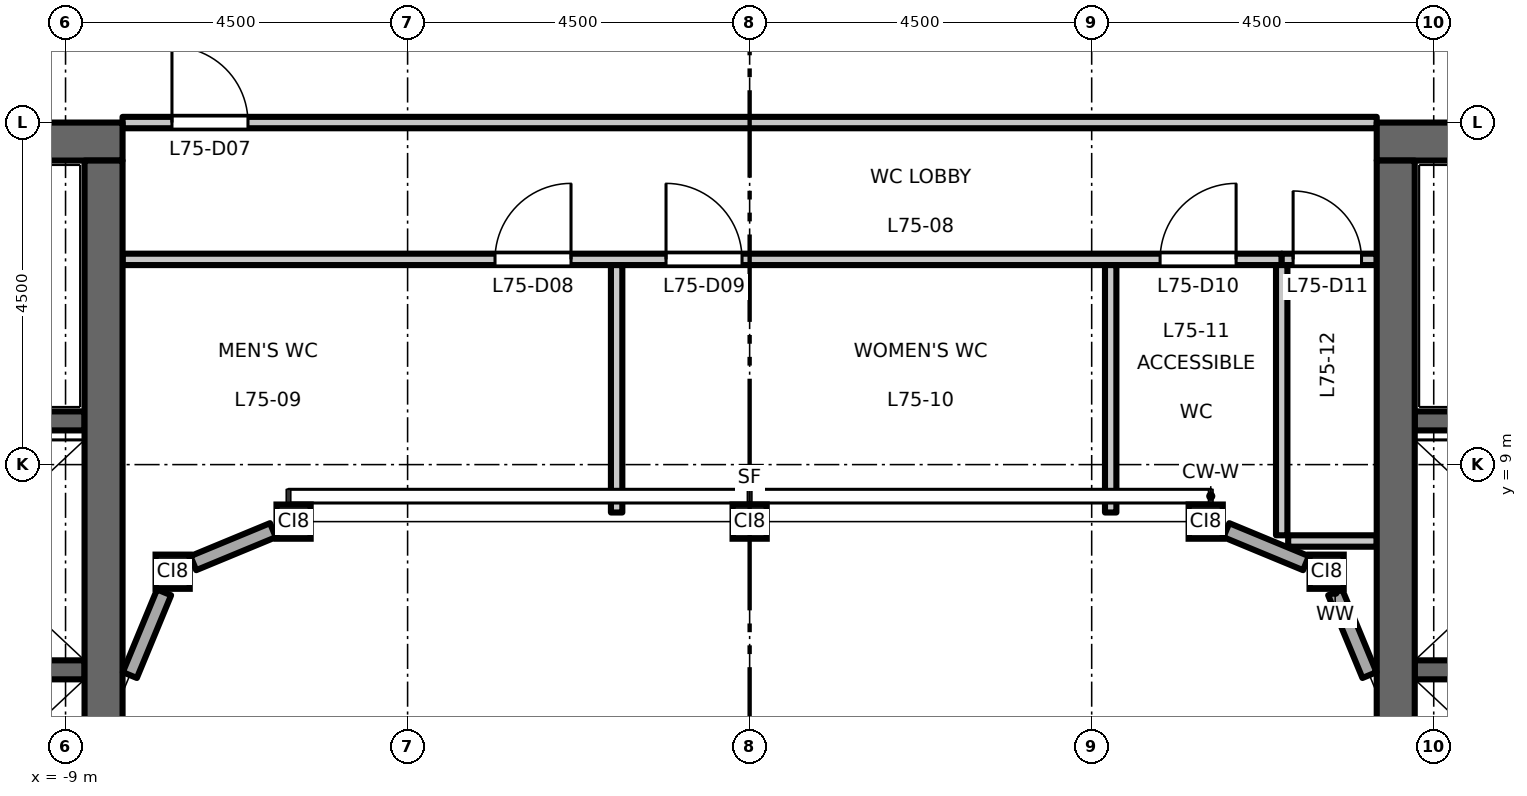
"""IFC4 building model, lengths in metres.
Left out: names, types, materials, properties, quantities, classifications, styles, units other than length and angle.
Written with IfcOpenShell. Run it as: python <this file> out.ifc"""

import sys

from ifc_helpers import new_model, si_unit, direction, frame, frame_2d, origin, origin_2d, place, context, subcontext, project, spatial, rectangle, hollow_rectangle, extrude, element, fill, save


model = new_model("IFC4")
c1 = context("Model", 3, precision=1e-05, world=origin(), true_north=direction((0.0, 1.0)))
c2 = subcontext(c1, "Body", "Model", "MODEL_VIEW")
j1 = project(units=[si_unit("LENGTHUNIT", "METRE"), si_unit("PLANEANGLEUNIT", "RADIAN")], contexts=[c1])
p1 = place(None, origin())
s1 = spatial("IfcSite", under=j1, at=p1, CompositionType="ELEMENT")
p2 = place(p1, origin())
s2 = spatial("IfcBuilding", under=s1, at=p2, CompositionType="ELEMENT")
p3 = place(p2, frame((0.0, 0.0, 348.2)))
s3 = spatial("IfcBuildingStorey", under=s2, at=p3, CompositionType="ELEMENT", Elevation=348.2)
for number, where, z_axis, x_axis in (
    (1, (-7.591, 7.591, 0.0), (0.0, 0.0, 1.0), (1.0, 0.0, 0.0)),
    (2, (-6.0, 8.25, 0.0), (0.0, 0.0, 1.0), (1.0, 0.0, 0.0)),
    (3, (0.0, 8.25, 0.0), (0.0, 0.0, 1.0), (1.0, 0.0, 0.0)),
    (4, (6.0, 8.25, 0.0), (0.0, 0.0, 1.0), (1.0, 0.0, 0.0)),
    (5, (7.591, 7.591, 0.0), (0.0, 0.0, 1.0), (1.0, 0.0, 0.0)),
):
    element("IfcColumn", number, at=place(p3, frame(where, z_axis=z_axis, x_axis=x_axis)), inside=s3, PredefinedType="COLUMN", context=c2, shape_type="SweptSolid", body=[
        extrude(hollow_rectangle(XDim=0.45, YDim=0.45, WallThickness=0.022, at=origin_2d()), origin(), (0.0, 0.0, 1.0), 5.0),
    ])
p4 = place(p3, frame((-8.75, 6.3, 0.0), z_axis=(0.0, 0.0, 1.0), x_axis=(-1.0, 0.0, 0.0)))
e6 = element("IfcWall", 6, at=p4, inside=s3, PredefinedType="SHEAR", context=c2, shape_type="SweptSolid", body=[
    extrude(rectangle(XDim=3.1, YDim=0.25, at=frame_2d((1.55, 0.0))), origin(), (0.0, 0.0, 1.0), 4.8),
])
p5 = place(p3, frame((-8.75, 9.575, 0.0), z_axis=(0.0, 0.0, 1.0), x_axis=(-1.0, 0.0, 0.0)))
e7 = element("IfcWall", 7, at=p5, inside=s3, PredefinedType="SHEAR", context=c2, shape_type="SweptSolid", body=[
    extrude(rectangle(XDim=8.0, YDim=0.25, at=frame_2d((4.0, 0.0))), origin(), (0.0, 0.0, 1.0), 4.8),
])
p6 = place(p5, frame((6.65, 0.0, 0.0)))
e8 = element("IfcOpeningElement", 8, at=p6, cuts=e7, PredefinedType="OPENING", context=c2, shape_type="SweptSolid", body=[
    extrude(rectangle(XDim=1.1, YDim=2.1, at=frame_2d((0.55, 1.05))), frame((0.0, 0.135, 0.0), z_axis=(0.0, -1.0, 0.0), x_axis=(1.0, 0.0, 0.0)), (0.0, 0.0, 1.0), 0.27),
])
p7 = place(p3, frame((-8.25, 13.25, 0.0), z_axis=(0.0, 0.0, 1.0), x_axis=(-1.0, 0.0, 0.0)))
e9 = element("IfcWall", 9, at=p7, inside=s3, PredefinedType="SHEAR", context=c2, shape_type="SweptSolid", body=[
    extrude(rectangle(XDim=9.0, YDim=0.5, at=frame_2d((4.5, 0.0))), origin(), (0.0, 0.0, 1.0), 4.8),
])
p8 = place(p3, frame((-8.5, -13.0, 0.0), z_axis=(0.0, 0.0, 1.0), x_axis=(0.0, 1.0, 0.0)))
e10 = element("IfcWall", 10, at=p8, inside=s3, PredefinedType="SHEAR", context=c2, shape_type="SweptSolid", body=[
    extrude(rectangle(XDim=26.0, YDim=0.5, at=frame_2d((13.0, 0.0))), origin(), (0.0, 0.0, 1.0), 4.8),
])
p9 = place(p3, frame((8.75, 6.3, 0.0), z_axis=(0.0, 0.0, 1.0), x_axis=(1.0, 0.0, 0.0)))
e11 = element("IfcWall", 11, at=p9, inside=s3, PredefinedType="SHEAR", context=c2, shape_type="SweptSolid", body=[
    extrude(rectangle(XDim=3.1, YDim=0.25, at=frame_2d((1.55, 0.0))), origin(), (0.0, 0.0, 1.0), 4.8),
])
p10 = place(p3, frame((8.75, 9.575, 0.0), z_axis=(0.0, 0.0, 1.0), x_axis=(1.0, 0.0, 0.0)))
e12 = element("IfcWall", 12, at=p10, inside=s3, PredefinedType="SHEAR", context=c2, shape_type="SweptSolid", body=[
    extrude(rectangle(XDim=8.0, YDim=0.25, at=frame_2d((4.0, 0.0))), origin(), (0.0, 0.0, 1.0), 4.8),
])
p11 = place(p10, frame((6.65, 0.0, 0.0)))
e13 = element("IfcOpeningElement", 13, at=p11, cuts=e12, PredefinedType="OPENING", context=c2, shape_type="SweptSolid", body=[
    extrude(rectangle(XDim=1.1, YDim=2.1, at=frame_2d((0.55, 1.05))), frame((0.0, 0.135, 0.0), z_axis=(0.0, -1.0, 0.0), x_axis=(1.0, 0.0, 0.0)), (0.0, 0.0, 1.0), 0.27),
])
p12 = place(p3, frame((8.25, 13.25, 0.0), z_axis=(0.0, 0.0, 1.0), x_axis=(1.0, 0.0, 0.0)))
e14 = element("IfcWall", 14, at=p12, inside=s3, PredefinedType="SHEAR", context=c2, shape_type="SweptSolid", body=[
    extrude(rectangle(XDim=9.0, YDim=0.5, at=frame_2d((4.5, 0.0))), origin(), (0.0, 0.0, 1.0), 4.8),
])
p13 = place(p3, frame((8.5, -13.0, 0.0), z_axis=(0.0, 0.0, 1.0), x_axis=(0.0, 1.0, 0.0)))
e15 = element("IfcWall", 15, at=p13, inside=s3, PredefinedType="SHEAR", context=c2, shape_type="SweptSolid", body=[
    extrude(rectangle(XDim=26.0, YDim=0.5, at=frame_2d((13.0, 0.0))), origin(), (0.0, 0.0, 1.0), 4.8),
])
p14 = place(p3, frame((8.154, 6.231, 0.0), z_axis=(0.0, 0.0, 1.0), x_axis=(-0.382760542083, 0.92384758885, 0.0)))
e16 = element("IfcWall", 16, at=p14, inside=s3, PredefinedType="STANDARD", context=c2, shape_type="SweptSolid", body=[
    extrude(rectangle(XDim=1.178, YDim=0.2, at=frame_2d((0.589, 0.0))), origin(), (0.0, 0.0, 1.0), 4.46),
])
for number, where, z_axis, x_axis in (
    (17, (7.319, 7.703, 0.0), (0.0, 0.0, 1.0), (-0.924, 0.383, 0.0)),
    (18, (-6.271, 8.137, 0.0), (0.0, 0.0, 1.0), (-0.924, -0.383, 0.0)),
):
    element("IfcWall", number, at=place(p3, frame(where, z_axis=z_axis, x_axis=x_axis)), inside=s3, PredefinedType="STANDARD", context=c2, shape_type="SweptSolid", body=[
        extrude(rectangle(XDim=1.134, YDim=0.2, at=frame_2d((0.567, 0.0))), origin(), (0.0, 0.0, 1.0), 4.46),
    ])
p15 = place(p3, frame((-7.703, 7.319, 0.0), z_axis=(0.0, 0.0, 1.0), x_axis=(-0.382760542083, -0.92384758885, 0.0)))
e19 = element("IfcWall", 19, at=p15, inside=s3, PredefinedType="STANDARD", context=c2, shape_type="SweptSolid", body=[
    extrude(rectangle(XDim=1.178, YDim=0.2, at=frame_2d((0.589, 0.0))), origin(), (0.0, 0.0, 1.0), 4.46),
])
p16 = place(p3, frame((7.085, 7.995, 0.0), z_axis=(0.0, 0.0, 1.0), x_axis=(1.0, 0.0, 0.0)))
e20 = element("IfcWall", 20, at=p16, inside=s3, PredefinedType="PARTITIONING", context=c2, shape_type="SweptSolid", body=[
    extrude(rectangle(XDim=1.165, YDim=0.15, at=frame_2d((0.583, 0.0))), origin(), (0.0, 0.0, 1.0), 4.8),
])
p17 = place(p3, frame((-8.25, 11.7, 0.0), z_axis=(0.0, 0.0, 1.0), x_axis=(1.0, 0.0, 0.0)))
e21 = element("IfcWall", 21, at=p17, inside=s3, PredefinedType="PARTITIONING", context=c2, shape_type="SweptSolid", body=[
    extrude(rectangle(XDim=15.25, YDim=0.15, at=frame_2d((7.625, 0.0))), origin(), (0.0, 0.0, 1.0), 4.8),
])
p18 = place(p17, frame((4.9, 0.0, 0.0)))
e22 = element("IfcOpeningElement", 22, at=p18, cuts=e21, PredefinedType="OPENING", context=c2, shape_type="SweptSolid", body=[
    extrude(rectangle(XDim=1.0, YDim=2.1, at=frame_2d((0.5, 1.05))), frame((0.0, 0.085, 0.0), z_axis=(0.0, -1.0, 0.0), x_axis=(1.0, 0.0, 0.0)), (0.0, 0.0, 1.0), 0.17),
])
p19 = place(p17, frame((7.15, 0.0, 0.0)))
e23 = element("IfcOpeningElement", 23, at=p19, cuts=e21, PredefinedType="OPENING", context=c2, shape_type="SweptSolid", body=[
    extrude(rectangle(XDim=1.0, YDim=2.1, at=frame_2d((0.5, 1.05))), frame((0.0, 0.085, 0.0), z_axis=(0.0, -1.0, 0.0), x_axis=(1.0, 0.0, 0.0)), (0.0, 0.0, 1.0), 0.17),
])
p20 = place(p17, frame((13.65, 0.0, 0.0)))
e24 = element("IfcOpeningElement", 24, at=p20, cuts=e21, PredefinedType="OPENING", context=c2, shape_type="SweptSolid", body=[
    extrude(rectangle(XDim=1.0, YDim=2.1, at=frame_2d((0.5, 1.05))), frame((0.0, 0.085, 0.0), z_axis=(0.0, -1.0, 0.0), x_axis=(1.0, 0.0, 0.0)), (0.0, 0.0, 1.0), 0.17),
])
p21 = place(p3, frame((7.0, 11.7, 0.0), z_axis=(0.0, 0.0, 1.0), x_axis=(1.0, 0.0, 0.0)))
e25 = element("IfcWall", 25, at=p21, inside=s3, PredefinedType="PARTITIONING", context=c2, shape_type="SweptSolid", body=[
    extrude(rectangle(XDim=1.25, YDim=0.15, at=frame_2d((0.625, 0.0))), origin(), (0.0, 0.0, 1.0), 4.8),
])
p22 = place(p21, frame((0.15, 0.0, 0.0)))
e26 = element("IfcOpeningElement", 26, at=p22, cuts=e25, PredefinedType="OPENING", context=c2, shape_type="SweptSolid", body=[
    extrude(rectangle(XDim=0.9, YDim=2.1, at=frame_2d((0.45, 1.05))), frame((0.0, 0.085, 0.0), z_axis=(0.0, -1.0, 0.0), x_axis=(1.0, 0.0, 0.0)), (0.0, 0.0, 1.0), 0.17),
])
p23 = place(p3, frame((-8.25, 13.5, 0.0), z_axis=(0.0, 0.0, 1.0), x_axis=(1.0, 0.0, 0.0)))
e27 = element("IfcWall", 27, at=p23, inside=s3, PredefinedType="PARTITIONING", context=c2, shape_type="SweptSolid", body=[
    extrude(rectangle(XDim=16.5, YDim=0.15, at=frame_2d((8.25, 0.0))), origin(), (0.0, 0.0, 1.0), 4.8),
])
p24 = place(p23, frame((0.65, 0.0, 0.0)))
e28 = element("IfcOpeningElement", 28, at=p24, cuts=e27, PredefinedType="OPENING", context=c2, shape_type="SweptSolid", body=[
    extrude(rectangle(XDim=1.0, YDim=2.1, at=frame_2d((0.5, 1.05))), frame((0.0, 0.085, 0.0), z_axis=(0.0, -1.0, 0.0), x_axis=(1.0, 0.0, 0.0)), (0.0, 0.0, 1.0), 0.17),
])
for number, where, z_axis, x_axis in (
    (29, (-1.75, 8.37, 0.0), (0.0, 0.0, 1.0), (0.0, 1.0, 0.0)),
    (30, (4.75, 8.37, 0.0), (0.0, 0.0, 1.0), (0.0, 1.0, 0.0)),
):
    element("IfcWall", number, at=place(p3, frame(where, z_axis=z_axis, x_axis=x_axis)), inside=s3, PredefinedType="PARTITIONING", context=c2, shape_type="SweptSolid", body=[
        extrude(rectangle(XDim=3.255, YDim=0.15, at=frame_2d((1.627, 0.0))), origin(), (0.0, 0.0, 1.0), 4.8),
    ])
p25 = place(p3, frame((7.0, 8.07, 0.0), z_axis=(0.0, 0.0, 1.0), x_axis=(0.0, 1.0, 0.0)))
e31 = element("IfcWall", 31, at=p25, inside=s3, PredefinedType="PARTITIONING", context=c2, shape_type="SweptSolid", body=[
    extrude(rectangle(XDim=3.555, YDim=0.15, at=frame_2d((1.777, 0.0))), origin(), (0.0, 0.0, 1.0), 4.8),
])
p26 = place(p24, origin())
e32 = element("IfcDoor", 32, at=p26, inside=s3, OperationType="SINGLE_SWING_LEFT", PredefinedType="DOOR", context=c2, shape_type="SweptSolid", body=[
    extrude(rectangle(XDim=1.0, YDim=2.1, at=frame_2d((0.5, 1.05))), frame((0.0, 0.025, 0.0), z_axis=(0.0, -1.0, 0.0), x_axis=(1.0, 0.0, 0.0)), (0.0, 0.0, 1.0), 0.05),
])
fill(e28, e32)
p27 = place(p18, origin())
e33 = element("IfcDoor", 33, at=p27, inside=s3, OperationType="SINGLE_SWING_RIGHT", PredefinedType="DOOR", context=c2, shape_type="SweptSolid", body=[
    extrude(rectangle(XDim=1.0, YDim=2.1, at=frame_2d((0.5, 1.05))), frame((0.0, 0.025, 0.0), z_axis=(0.0, -1.0, 0.0), x_axis=(1.0, 0.0, 0.0)), (0.0, 0.0, 1.0), 0.05),
])
fill(e22, e33)
p28 = place(p19, origin())
e34 = element("IfcDoor", 34, at=p28, inside=s3, OperationType="SINGLE_SWING_LEFT", PredefinedType="DOOR", context=c2, shape_type="SweptSolid", body=[
    extrude(rectangle(XDim=1.0, YDim=2.1, at=frame_2d((0.5, 1.05))), frame((0.0, 0.025, 0.0), z_axis=(0.0, -1.0, 0.0), x_axis=(1.0, 0.0, 0.0)), (0.0, 0.0, 1.0), 0.05),
])
fill(e23, e34)
p29 = place(p20, origin())
e35 = element("IfcDoor", 35, at=p29, inside=s3, OperationType="SINGLE_SWING_RIGHT", PredefinedType="DOOR", context=c2, shape_type="SweptSolid", body=[
    extrude(rectangle(XDim=1.0, YDim=2.1, at=frame_2d((0.5, 1.05))), frame((0.0, 0.025, 0.0), z_axis=(0.0, -1.0, 0.0), x_axis=(1.0, 0.0, 0.0)), (0.0, 0.0, 1.0), 0.05),
])
fill(e24, e35)
p30 = place(p22, origin())
e36 = element("IfcDoor", 36, at=p30, inside=s3, OperationType="SINGLE_SWING_LEFT", PredefinedType="DOOR", context=c2, shape_type="SweptSolid", body=[
    extrude(rectangle(XDim=0.9, YDim=2.1, at=frame_2d((0.45, 1.05))), frame((0.0, 0.025, 0.0), z_axis=(0.0, -1.0, 0.0), x_axis=(1.0, 0.0, 0.0)), (0.0, 0.0, 1.0), 0.05),
])
fill(e26, e36)
save(model, sys.argv[1])
